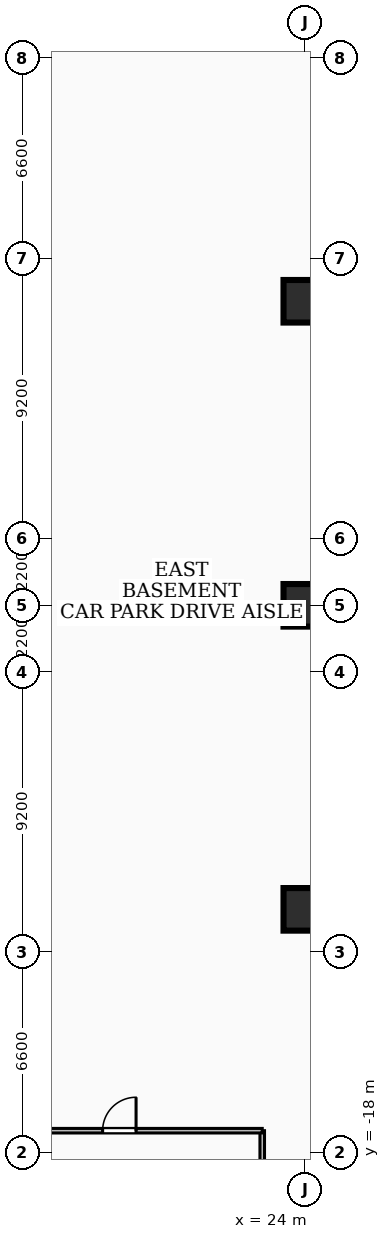
"""IFC4 building model, lengths in metres.
Left out: names, types, materials, properties, quantities, classifications, styles, units other than length and angle.
Written with IfcOpenShell. Run it as: python <this file> out.ifc"""

import sys

from ifc_helpers import new_model, si_unit, direction, frame, frame_2d, origin, origin_2d, place, context, subcontext, project, spatial, rectangle, extrude, element, fill, save


model = new_model("IFC4")
c1 = context("Model", 3, precision=1e-05, world=origin(), true_north=direction((0.0, 1.0)))
c2 = subcontext(c1, "Body", "Model", "MODEL_VIEW")
j1 = project(units=[si_unit("LENGTHUNIT", "METRE"), si_unit("PLANEANGLEUNIT", "RADIAN")], contexts=[c1])
p1 = place(None, origin())
s1 = spatial("IfcSite", under=j1, at=p1, CompositionType="ELEMENT")
p2 = place(p1, origin())
s2 = spatial("IfcBuilding", under=s1, at=p2, CompositionType="ELEMENT")
p3 = place(p2, frame((0.0, 0.0, -9.0)))
s3 = spatial("IfcBuildingStorey", under=s2, at=p3, CompositionType="ELEMENT", Elevation=-9.0)
for number, where, z_axis, x_axis in (
    (1, (24.0, -10.0, 0.0), (0.0, 0.0, 1.0), (1.0, 0.0, 0.0)),
    (2, (24.0, 0.0, 0.0), (0.0, 0.0, 1.0), (1.0, 0.0, 0.0)),
    (3, (24.0, 10.0, 0.0), (0.0, 0.0, 1.0), (1.0, 0.0, 0.0)),
):
    element("IfcColumn", number, at=place(p3, frame(where, z_axis=z_axis, x_axis=x_axis)), inside=s3, PredefinedType="COLUMN", context=c2, shape_type="SweptSolid", body=[
        extrude(rectangle(XDim=1.4, YDim=1.4, at=origin_2d()), origin(), (0.0, 0.0, 1.0), 4.5),
    ])
p4 = place(p3, frame((13.2, -17.28, 0.0), z_axis=(0.0, 0.0, 1.0), x_axis=(1.0, 0.0, 0.0)))
e4 = element("IfcWall", 4, at=p4, inside=s3, PredefinedType="PARTITIONING", context=c2, shape_type="SweptSolid", body=[
    extrude(rectangle(XDim=9.4, YDim=0.15, at=frame_2d((4.7, 0.0))), origin(), (0.0, 0.0, 1.0), 4.18),
])
p5 = place(p4, frame((4.15, 0.0, 0.0)))
e5 = element("IfcOpeningElement", 5, at=p5, cuts=e4, PredefinedType="OPENING", context=c2, shape_type="SweptSolid", body=[
    extrude(rectangle(XDim=1.1, YDim=2.15, at=frame_2d((0.55, 1.075))), frame((0.0, 0.085, 0.0), z_axis=(0.0, -1.0, 0.0), x_axis=(1.0, 0.0, 0.0)), (0.0, 0.0, 1.0), 0.17),
])
p6 = place(p3, frame((22.6, -25.8, 0.0), z_axis=(0.0, 0.0, 1.0), x_axis=(0.0, 1.0, 0.0)))
e6 = element("IfcWall", 6, at=p6, inside=s3, PredefinedType="PARTITIONING", context=c2, shape_type="SweptSolid", body=[
    extrude(rectangle(XDim=8.52, YDim=0.15, at=frame_2d((4.26, 0.0))), origin(), (0.0, 0.0, 1.0), 4.18),
])
p7 = place(p5, origin())
e7 = element("IfcDoor", 7, at=p7, inside=s3, OperationType="SINGLE_SWING_RIGHT", PredefinedType="DOOR", context=c2, shape_type="SweptSolid", body=[
    extrude(rectangle(XDim=1.1, YDim=2.15, at=frame_2d((0.55, 1.075))), frame((0.0, 0.025, 0.0), z_axis=(0.0, -1.0, 0.0), x_axis=(1.0, 0.0, 0.0)), (0.0, 0.0, 1.0), 0.05),
])
fill(e5, e7)
save(model, sys.argv[1])
